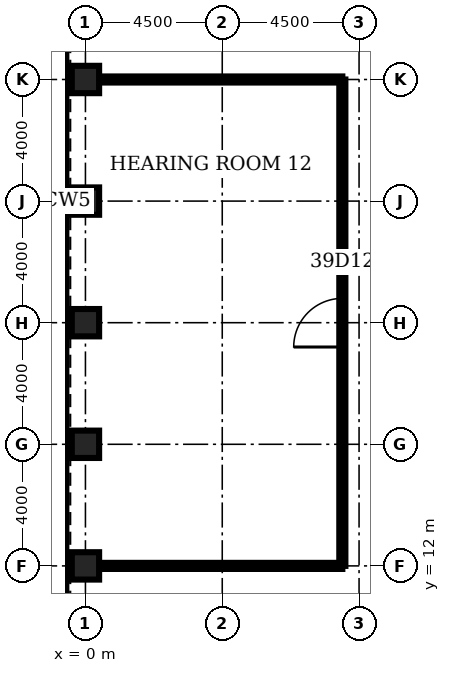
"""IFC4 building model, lengths in metres.
Left out: names, types, materials, properties, quantities, classifications, styles, units other than length and angle.
Written with IfcOpenShell. Run it as: python <this file> out.ifc"""

import sys

from ifc_helpers import new_model, si_unit, direction, frame, frame_2d, origin, origin_2d, place, context, subcontext, project, spatial, rectangle, hollow_rectangle, extrude, element, fill, save


model = new_model("IFC4")
c1 = context("Model", 3, precision=1e-05, world=origin(), true_north=direction((0.0, 1.0)))
c2 = subcontext(c1, "Body", "Model", "MODEL_VIEW")
j1 = project(units=[si_unit("LENGTHUNIT", "METRE"), si_unit("PLANEANGLEUNIT", "RADIAN")], contexts=[c1])
p1 = place(None, origin())
s1 = spatial("IfcSite", under=j1, at=p1, CompositionType="ELEMENT")
p2 = place(p1, origin())
s2 = spatial("IfcBuilding", under=s1, at=p2, CompositionType="ELEMENT")
p3 = place(p2, frame((0.0, 0.0, 176.1)))
s3 = spatial("IfcBuildingStorey", under=s2, at=p3, CompositionType="ELEMENT", Elevation=176.1)
for number, where, z_axis, x_axis in (
    (1, (0.0, 28.0, 0.0), (0.0, 0.0, 1.0), (1.0, 0.0, 0.0)),
    (2, (0.0, 24.0, 0.0), (0.0, 0.0, 1.0), (1.0, 0.0, 0.0)),
    (3, (0.0, 20.0, 0.0), (0.0, 0.0, 1.0), (1.0, 0.0, 0.0)),
    (4, (0.0, 16.0, 0.0), (0.0, 0.0, 1.0), (1.0, 0.0, 0.0)),
    (5, (0.0, 12.0, 0.0), (0.0, 0.0, 1.0), (1.0, 0.0, 0.0)),
):
    element("IfcColumn", number, at=place(p3, frame(where, z_axis=z_axis, x_axis=x_axis)), inside=s3, PredefinedType="COLUMN", context=c2, shape_type="SweptSolid", body=[
        extrude(hollow_rectangle(XDim=0.9, YDim=0.9, WallThickness=0.09, at=origin_2d()), origin(), (0.0, 0.0, 1.0), 4.2),
    ])
for number, where, z_axis, x_axis in (
    (6, (0.45, 12.0, 0.0), (0.0, 0.0, 1.0), (1.0, 0.0, 0.0)),
    (7, (0.45, 28.0, 0.0), (0.0, 0.0, 1.0), (1.0, 0.0, 0.0)),
):
    element("IfcWall", number, at=place(p3, frame(where, z_axis=z_axis, x_axis=x_axis)), inside=s3, PredefinedType="PARTITIONING", context=c2, shape_type="SweptSolid", body=[
        extrude(rectangle(XDim=8.0, YDim=0.2, at=frame_2d((4.0, 0.0))), origin(), (0.0, 0.0, 1.0), 3.0),
    ])
p4 = place(p3, frame((8.45, 12.0, 0.0), z_axis=(0.0, 0.0, 1.0), x_axis=(0.0, 1.0, 0.0)))
e8 = element("IfcWall", 8, at=p4, inside=s3, PredefinedType="PARTITIONING", context=c2, shape_type="SweptSolid", body=[
    extrude(rectangle(XDim=16.0, YDim=0.2, at=frame_2d((8.0, 0.0))), origin(), (0.0, 0.0, 1.0), 3.0),
])
p5 = place(p4, frame((7.2, 0.0, 0.0)))
e9 = element("IfcOpeningElement", 9, at=p5, cuts=e8, PredefinedType="OPENING", context=c2, shape_type="SweptSolid", body=[
    extrude(rectangle(XDim=1.6, YDim=2.1, at=frame_2d((0.8, 1.05))), frame((0.0, 0.11, 0.0), z_axis=(0.0, -1.0, 0.0), x_axis=(1.0, 0.0, 0.0)), (0.0, 0.0, 1.0), 0.22),
])
p6 = place(p5, origin())
e10 = element("IfcDoor", 10, at=p6, inside=s3, OperationType="SINGLE_SWING_LEFT", PredefinedType="DOOR", context=c2, shape_type="SweptSolid", body=[
    extrude(rectangle(XDim=1.6, YDim=2.1, at=frame_2d((0.8, 1.05))), frame((0.0, 0.025, 0.0), z_axis=(0.0, -1.0, 0.0), x_axis=(1.0, 0.0, 0.0)), (0.0, 0.0, 1.0), 0.05),
])
fill(e9, e10)
save(model, sys.argv[1])
